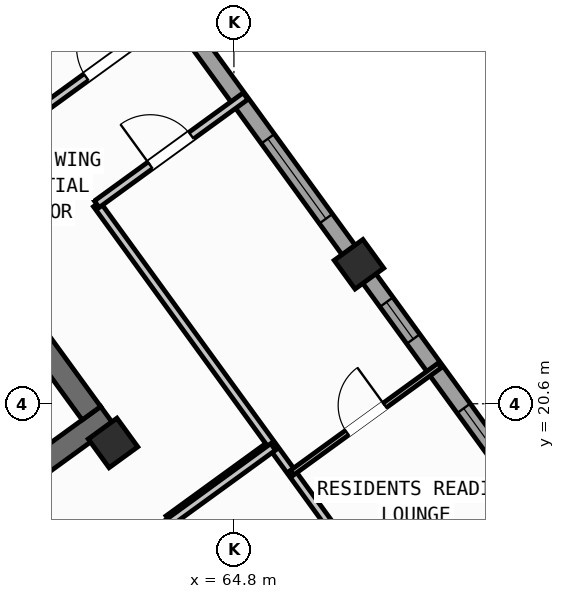
"""IFC4 building model, lengths in metres.
Left out: names, types, materials, properties, quantities, classifications, styles, units other than length and angle.
Written with IfcOpenShell. Run it as: python <this file> out.ifc"""

import sys

from ifc_helpers import new_model, si_unit, direction, frame, frame_2d, origin, origin_2d, place, context, subcontext, project, spatial, rectangle, hollow_rectangle, extrude, source, transform, mapped, element, fill, save


model = new_model("IFC4")
c1 = context("Model", 3, precision=1e-05, world=origin(), true_north=direction((0.0, 1.0)))
c2 = subcontext(c1, "Body", "Model", "MODEL_VIEW")
j1 = project(units=[si_unit("LENGTHUNIT", "METRE"), si_unit("PLANEANGLEUNIT", "RADIAN")], contexts=[c1])
p1 = place(None, origin())
s1 = spatial("IfcSite", under=j1, at=p1, CompositionType="ELEMENT")
p2 = place(p1, origin())
s2 = spatial("IfcBuilding", under=s1, at=p2, CompositionType="ELEMENT")
p3 = place(p2, frame((0.0, 0.0, 259.2)))
s3 = spatial("IfcBuildingStorey", under=s2, at=p3, CompositionType="ELEMENT", Elevation=259.2)
p4 = place(p3, frame((52.399, 13.169, 0.0), z_axis=(0.0, 0.0, 1.0), x_axis=(0.809022352778, 0.587777877013, 0.0)))
e1 = element("IfcWall", 1, at=p4, inside=s3, PredefinedType="SHEAR", context=c2, shape_type="SweptSolid", body=[
    extrude(rectangle(XDim=12.24, YDim=0.45, at=frame_2d((6.12, 0.0))), origin(), (0.0, 0.0, 1.0), 3.35),
])
p5 = place(p3, frame((61.988, 20.413, 0.0), z_axis=(0.0, 0.0, 1.0), x_axis=(-0.587819244441, 0.808992296542, 0.0)))
e2 = element("IfcWall", 2, at=p5, inside=s3, PredefinedType="SHEAR", context=c2, shape_type="SweptSolid", body=[
    extrude(rectangle(XDim=3.625, YDim=0.45, at=frame_2d((1.812, 0.0))), origin(), (0.0, 0.0, 1.0), 3.35),
])
m1 = source(origin(), c2, "Body", "SweptSolid", [
    extrude(hollow_rectangle(XDim=0.7, YDim=0.7, WallThickness=0.028, at=origin_2d()), origin(), (0.0, 0.0, 1.0), 3.6),
])
for number, where, z_axis, x_axis in (
    (3, (62.414, 19.827, 0.0), (0.0, 0.0, 1.0), (0.809, 0.588, 0.0)),
    (4, (67.268, 23.354, 0.0), (0.0, 0.0, 1.0), (0.809, 0.588, 0.0)),
):
    element("IfcColumn", number, at=place(p3, frame(where, z_axis=z_axis, x_axis=x_axis)), inside=s3, PredefinedType="COLUMN", context=c2, shape_type="MappedRepresentation", body=[
        mapped(m1, transform((0.0, 0.0, 0.0), scale=1.0)),
    ])
p6 = place(p3, frame((58.455, 35.484, 0.0), z_axis=(0.0, 0.0, 1.0), x_axis=(0.587783625747, -0.809018176127, 0.0)))
e5 = element("IfcWall", 5, at=p6, inside=s3, PredefinedType="STANDARD", context=c2, shape_type="SweptSolid", body=[
    extrude(rectangle(XDim=21.587, YDim=0.32, at=frame_2d((10.794, 0.0))), origin(), (0.0, 0.0, 1.0), 3.35),
])
p7 = place(p6, frame((1.744, 0.0, 0.9)))
e6 = element("IfcOpeningElement", 6, at=p7, cuts=e5, PredefinedType="OPENING", context=c2, shape_type="SweptSolid", body=[
    extrude(rectangle(XDim=1.65, YDim=1.45, at=frame_2d((0.825, 0.725))), frame((0.0, 0.17, 0.0), z_axis=(0.0, -1.0, 0.0), x_axis=(1.0, 0.0, 0.0)), (0.0, 0.0, 1.0), 0.34),
])
p8 = place(p6, frame((4.694, 0.0, 0.9)))
e7 = element("IfcOpeningElement", 7, at=p8, cuts=e5, PredefinedType="OPENING", context=c2, shape_type="SweptSolid", body=[
    extrude(rectangle(XDim=1.65, YDim=1.45, at=frame_2d((0.825, 0.725))), frame((0.0, 0.17, 0.0), z_axis=(0.0, -1.0, 0.0), x_axis=(1.0, 0.0, 0.0)), (0.0, 0.0, 1.0), 0.34),
])
p9 = place(p6, frame((11.934, 0.0, 0.95)))
e8 = element("IfcOpeningElement", 8, at=p9, cuts=e5, PredefinedType="OPENING", context=c2, shape_type="SweptSolid", body=[
    extrude(rectangle(XDim=1.95, YDim=1.35, at=frame_2d((0.975, 0.675))), frame((0.0, 0.17, 0.0), z_axis=(0.0, -1.0, 0.0), x_axis=(1.0, 0.0, 0.0)), (0.0, 0.0, 1.0), 0.34),
])
p10 = place(p6, frame((15.917, 0.0, 1.0)))
e9 = element("IfcOpeningElement", 9, at=p10, cuts=e5, PredefinedType="OPENING", context=c2, shape_type="SweptSolid", body=[
    extrude(rectangle(XDim=0.9, YDim=1.25, at=frame_2d((0.45, 0.625))), frame((0.0, 0.17, 0.0), z_axis=(0.0, -1.0, 0.0), x_axis=(1.0, 0.0, 0.0)), (0.0, 0.0, 1.0), 0.34),
])
p11 = place(p6, frame((18.51, 0.0, 0.9)))
e10 = element("IfcOpeningElement", 10, at=p11, cuts=e5, PredefinedType="OPENING", context=c2, shape_type="SweptSolid", body=[
    extrude(rectangle(XDim=1.65, YDim=1.45, at=frame_2d((0.825, 0.725))), frame((0.0, 0.17, 0.0), z_axis=(0.0, -1.0, 0.0), x_axis=(1.0, 0.0, 0.0)), (0.0, 0.0, 1.0), 0.34),
])
p12 = place(p3, frame((63.507, 18.322, 0.0), z_axis=(0.0, 0.0, 1.0), x_axis=(0.809034604122, 0.587761013791, 0.0)))
e11 = element("IfcWall", 11, at=p12, inside=s3, PredefinedType="PARTITIONING", context=c2, shape_type="SweptSolid", body=[
    extrude(rectangle(XDim=2.51, YDim=0.16, at=frame_2d((1.255, 0.0))), origin(), (0.0, 0.0, 1.0), 3.34),
])
p13 = place(p3, frame((68.353, 15.922, 0.0), z_axis=(0.0, 0.0, 1.0), x_axis=(-0.587783168305, 0.809018508476, 0.0)))
e12 = element("IfcWall", 12, at=p13, inside=s3, PredefinedType="PARTITIONING", context=c2, shape_type="SweptSolid", body=[
    extrude(rectangle(XDim=10.65, YDim=0.16, at=frame_2d((5.325, 0.0))), origin(), (0.0, 0.0, 1.0), 3.34),
])
p14 = place(p3, frame((62.093, 24.538, 0.0), z_axis=(0.0, 0.0, 1.0), x_axis=(0.809035546126, 0.58775971715, 0.0)))
e13 = element("IfcWall", 13, at=p14, inside=s3, PredefinedType="PARTITIONING", context=c2, shape_type="SweptSolid", body=[
    extrude(rectangle(XDim=3.63, YDim=0.16, at=frame_2d((1.815, 0.0))), origin(), (0.0, 0.0, 1.0), 3.34),
])
p15 = place(p14, frame((1.305, 0.0, 0.0)))
e14 = element("IfcOpeningElement", 14, at=p15, cuts=e13, PredefinedType="OPENING", context=c2, shape_type="SweptSolid", body=[
    extrude(rectangle(XDim=1.0, YDim=2.1, at=frame_2d((0.5, 1.05))), frame((0.0, 0.09, 0.0), z_axis=(0.0, -1.0, 0.0), x_axis=(1.0, 0.0, 0.0)), (0.0, 0.0, 1.0), 0.18),
])
p16 = place(p3, frame((60.829, 26.278, 0.0), z_axis=(0.0, 0.0, 1.0), x_axis=(0.809003564202, 0.587803736896, 0.0)))
e15 = element("IfcWall", 15, at=p16, inside=s3, PredefinedType="PARTITIONING", context=c2, shape_type="SweptSolid", body=[
    extrude(rectangle(XDim=3.63, YDim=0.16, at=frame_2d((1.815, 0.0))), origin(), (0.0, 0.0, 1.0), 3.34),
])
p17 = place(p16, frame((1.305, 0.0, 0.0)))
e16 = element("IfcOpeningElement", 16, at=p17, cuts=e15, PredefinedType="OPENING", context=c2, shape_type="SweptSolid", body=[
    extrude(rectangle(XDim=1.0, YDim=2.1, at=frame_2d((0.5, 1.05))), frame((0.0, 0.09, 0.0), z_axis=(0.0, -1.0, 0.0), x_axis=(1.0, 0.0, 0.0)), (0.0, 0.0, 1.0), 0.18),
])
p18 = place(p3, frame((65.944, 19.238, 0.0), z_axis=(0.0, 0.0, 1.0), x_axis=(0.809013833588, 0.587789602718, 0.0)))
e17 = element("IfcWall", 17, at=p18, inside=s3, PredefinedType="PARTITIONING", context=c2, shape_type="SweptSolid", body=[
    extrude(rectangle(XDim=3.61, YDim=0.11, at=frame_2d((1.805, 0.0))), origin(), (0.0, 0.0, 1.0), 3.34),
])
p19 = place(p18, frame((1.345, 0.0, 0.0)))
e18 = element("IfcOpeningElement", 18, at=p19, cuts=e17, PredefinedType="OPENING", context=c2, shape_type="SweptSolid", body=[
    extrude(rectangle(XDim=0.92, YDim=2.08, at=frame_2d((0.46, 1.04))), frame((0.0, 0.065, 0.0), z_axis=(0.0, -1.0, 0.0), x_axis=(1.0, 0.0, 0.0)), (0.0, 0.0, 1.0), 0.13),
])
p20 = place(p3, frame((53.705, 11.126, 0.0), z_axis=(0.0, 0.0, 1.0), x_axis=(0.809014504436, 0.587788679384, 0.0)))
e19 = element("IfcWall", 19, at=p20, inside=s3, PredefinedType="PARTITIONING", context=c2, shape_type="SweptSolid", body=[
    extrude(rectangle(XDim=14.67, YDim=0.16, at=frame_2d((7.335, 0.0))), origin(), (0.0, 0.0, 1.0), 3.34),
])
p21 = place(p20, frame((10.2, 0.0, 0.0)))
e20 = element("IfcOpeningElement", 20, at=p21, cuts=e19, PredefinedType="OPENING", context=c2, shape_type="SweptSolid", body=[
    extrude(rectangle(XDim=1.0, YDim=2.1, at=frame_2d((0.5, 1.05))), frame((0.0, 0.09, 0.0), z_axis=(0.0, -1.0, 0.0), x_axis=(1.0, 0.0, 0.0)), (0.0, 0.0, 1.0), 0.18),
])
m2 = source(origin(), c2, "Body", "SweptSolid", [
    extrude(rectangle(XDim=1.95, YDim=1.35, at=frame_2d((0.975, 0.675))), frame((0.0, 0.03, 0.0), z_axis=(0.0, -1.0, 0.0), x_axis=(1.0, 0.0, 0.0)), (0.0, 0.0, 1.0), 0.06),
])
p22 = place(p9, origin())
e21 = element("IfcWindow", 21, at=p22, inside=s3, PartitioningType="SINGLE_PANEL", PredefinedType="WINDOW", context=c2, shape_type="MappedRepresentation", body=[
    mapped(m2, transform((0.0, 0.0, 0.0), scale=1.0)),
])
fill(e8, e21)
m3 = source(origin(), c2, "Body", "SweptSolid", [
    extrude(rectangle(XDim=0.9, YDim=1.25, at=frame_2d((0.45, 0.625))), frame((0.0, 0.03, 0.0), z_axis=(0.0, -1.0, 0.0), x_axis=(1.0, 0.0, 0.0)), (0.0, 0.0, 1.0), 0.06),
])
p23 = place(p10, origin())
e22 = element("IfcWindow", 22, at=p23, inside=s3, PartitioningType="SINGLE_PANEL", PredefinedType="WINDOW", context=c2, shape_type="MappedRepresentation", body=[
    mapped(m3, transform((0.0, 0.0, 0.0), scale=1.0)),
])
fill(e9, e22)
m4 = source(origin(), c2, "Body", "SweptSolid", [
    extrude(rectangle(XDim=1.65, YDim=1.45, at=frame_2d((0.825, 0.725))), frame((0.0, 0.03, 0.0), z_axis=(0.0, -1.0, 0.0), x_axis=(1.0, 0.0, 0.0)), (0.0, 0.0, 1.0), 0.06),
])
p24 = place(p11, origin())
e23 = element("IfcWindow", 23, at=p24, inside=s3, PartitioningType="SINGLE_PANEL", PredefinedType="WINDOW", context=c2, shape_type="MappedRepresentation", body=[
    mapped(m4, transform((0.0, 0.0, 0.0), scale=1.0)),
])
fill(e10, e23)
m5 = source(origin(), c2, "Body", "SweptSolid", [
    extrude(rectangle(XDim=1.0, YDim=2.1, at=frame_2d((0.5, 1.05))), frame((0.0, 0.025, 0.0), z_axis=(0.0, -1.0, 0.0), x_axis=(1.0, 0.0, 0.0)), (0.0, 0.0, 1.0), 0.05),
])
p25 = place(p17, origin())
e24 = element("IfcDoor", 24, at=p25, inside=s3, OperationType="SINGLE_SWING_RIGHT", PredefinedType="DOOR", context=c2, shape_type="MappedRepresentation", body=[
    mapped(m5, transform((0.0, 0.0, 0.0), scale=1.0)),
])
fill(e16, e24)
p26 = place(p15, origin())
e25 = element("IfcDoor", 25, at=p26, inside=s3, OperationType="SINGLE_SWING_LEFT", PredefinedType="DOOR", context=c2, shape_type="MappedRepresentation", body=[
    mapped(m5, transform((0.0, 0.0, 0.0), scale=1.0)),
])
fill(e14, e25)
m6 = source(origin(), c2, "Body", "SweptSolid", [
    extrude(rectangle(XDim=0.92, YDim=2.08, at=frame_2d((0.46, 1.04))), frame((0.0, 0.025, 0.0), z_axis=(0.0, -1.0, 0.0), x_axis=(1.0, 0.0, 0.0)), (0.0, 0.0, 1.0), 0.05),
])
p27 = place(p19, origin())
e26 = element("IfcDoor", 26, at=p27, inside=s3, OperationType="SINGLE_SWING_RIGHT", PredefinedType="DOOR", context=c2, shape_type="MappedRepresentation", body=[
    mapped(m6, transform((0.0, 0.0, 0.0), scale=1.0)),
])
fill(e18, e26)
save(model, sys.argv[1])
